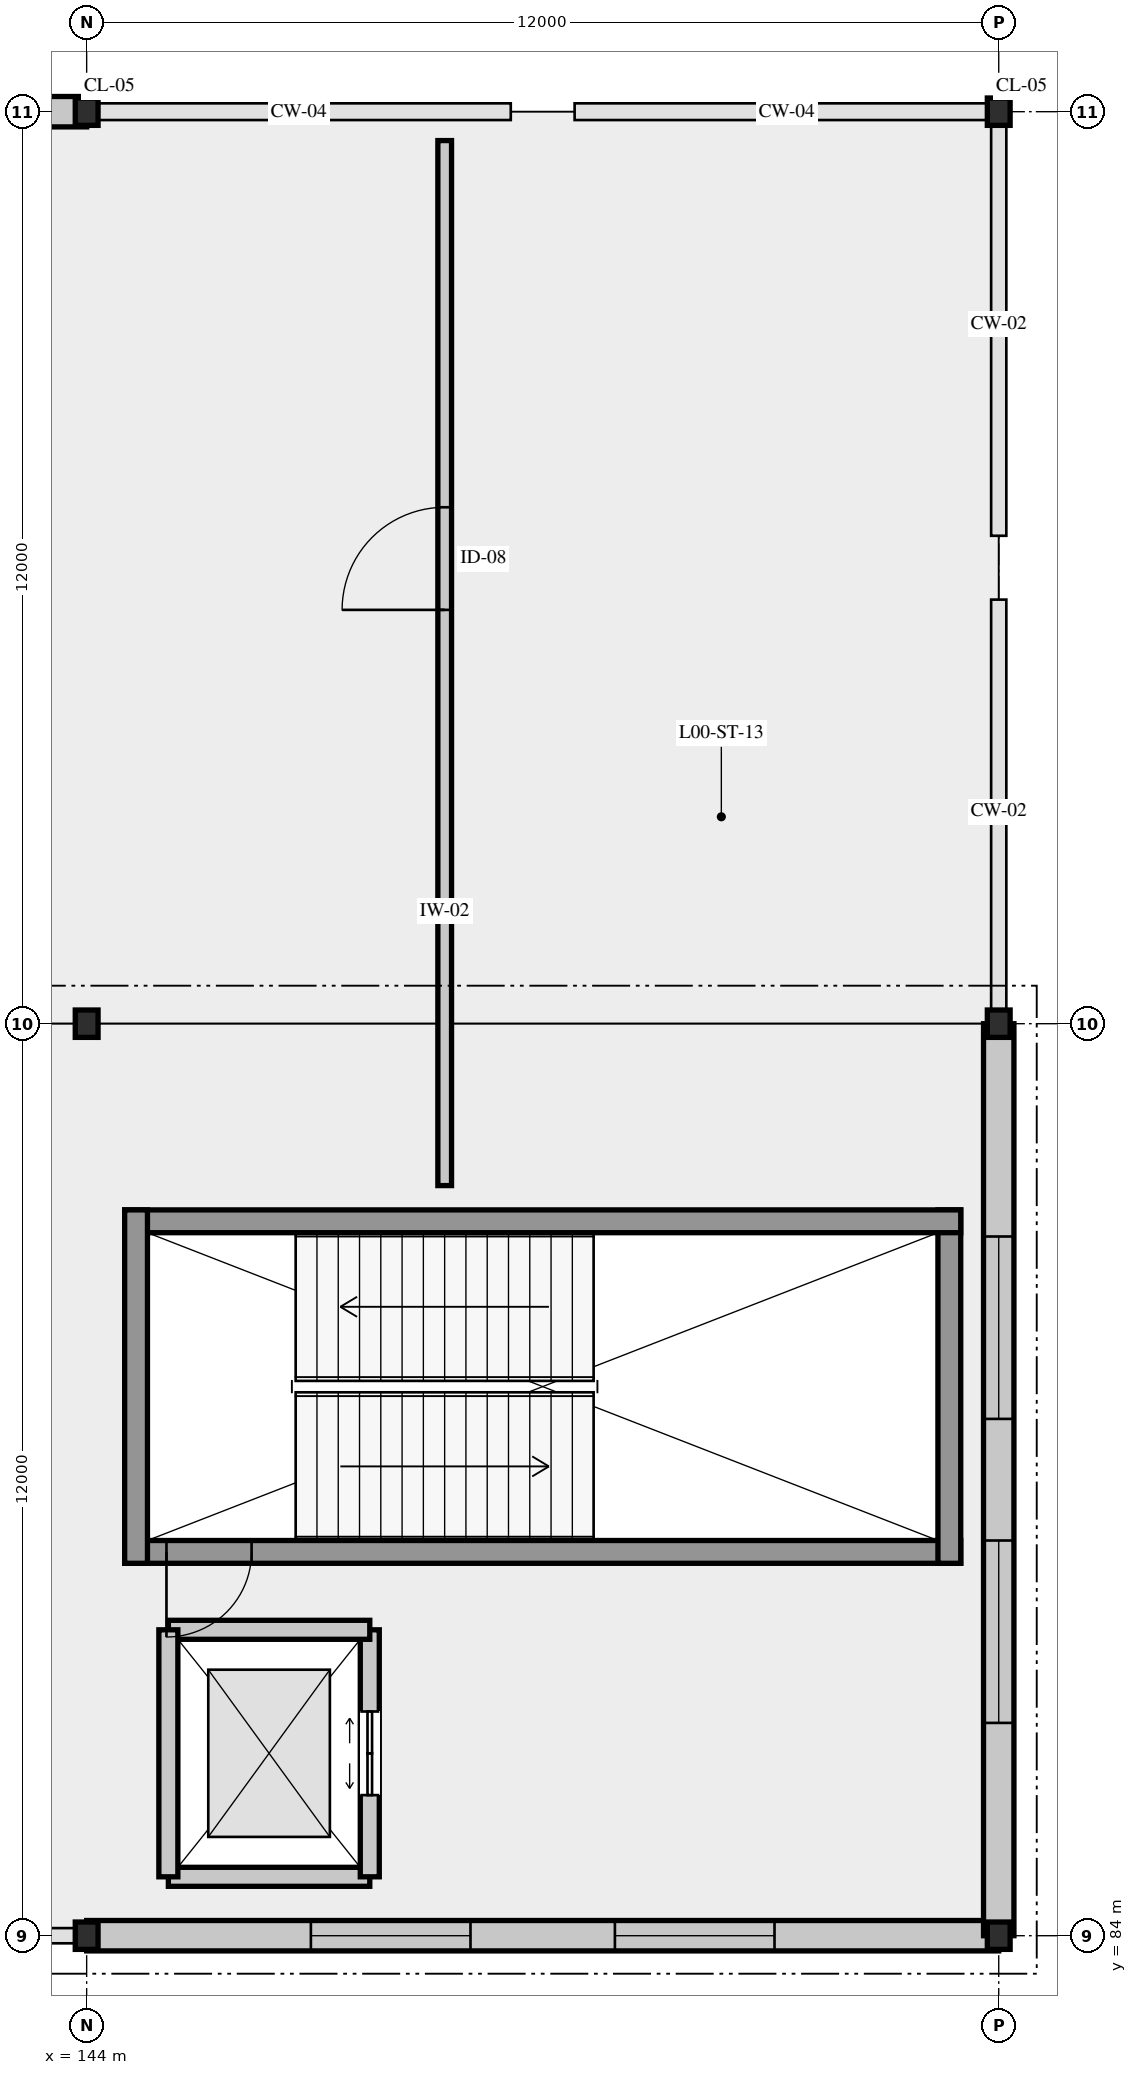
"""IFC4 building model, lengths in metres.
Left out: names, types, materials, properties, quantities, classifications, styles, units other than length and angle.
Written with IfcOpenShell. Run it as: python <this file> out.ifc"""

import sys

from ifc_helpers import new_model, si_unit, direction, frame, frame_2d, origin, origin_2d, place, context, subcontext, project, spatial, rectangle, i_section, extrude, element, fill, save


model = new_model("IFC4")
c1 = context("Model", 3, precision=1e-05, world=origin(), true_north=direction((0.0, 1.0)))
c2 = subcontext(c1, "Body", "Model", "MODEL_VIEW")
j1 = project(units=[si_unit("LENGTHUNIT", "METRE"), si_unit("PLANEANGLEUNIT", "RADIAN")], contexts=[c1])
p1 = place(None, origin())
s1 = spatial("IfcSite", under=j1, at=p1, CompositionType="ELEMENT")
p2 = place(p1, origin())
s2 = spatial("IfcBuilding", under=s1, at=p2, CompositionType="ELEMENT")
p3 = place(p2, origin())
s3 = spatial("IfcBuildingStorey", under=s2, at=p3, CompositionType="ELEMENT", Elevation=0.0)
for number, where, z_axis, x_axis in (
    (1, (144.0, 84.0, 0.0), (0.0, 0.0, 1.0), (1.0, 0.0, 0.0)),
    (2, (144.0, 96.0, 0.0), (0.0, 0.0, 1.0), (1.0, 0.0, 0.0)),
    (3, (144.0, 108.0, 0.0), (0.0, 0.0, 1.0), (1.0, 0.0, 0.0)),
    (4, (156.0, 84.0, 0.0), (0.0, 0.0, 1.0), (1.0, 0.0, 0.0)),
    (5, (156.0, 96.0, 0.0), (0.0, 0.0, 1.0), (1.0, 0.0, 0.0)),
    (6, (156.0, 108.0, 0.0), (0.0, 0.0, 1.0), (1.0, 0.0, 0.0)),
):
    element("IfcColumn", number, at=place(p3, frame(where, z_axis=z_axis, x_axis=x_axis)), inside=s3, PredefinedType="COLUMN", context=c2, shape_type="SweptSolid", body=[
        extrude(i_section(OverallWidth=0.3, OverallDepth=0.36, WebThickness=0.012, FlangeThickness=0.022, FilletRadius=0.027, at=origin_2d()), origin(), (0.0, 0.0, 1.0), 5.4),
    ])
p4 = place(p3, frame((144.0, 108.0, 0.0), z_axis=(0.0, 0.0, 1.0), x_axis=(-1.0, 0.0, 0.0)))
e7 = element("IfcWall", 7, at=p4, inside=s3, PredefinedType="SOLIDWALL", context=c2, shape_type="SweptSolid", body=[
    extrude(rectangle(XDim=12.0, YDim=0.4, at=frame_2d((6.0, 0.0))), origin(), (0.0, 0.0, 1.0), 4.52),
])
p5 = place(p4, frame((3.25, 0.0, 0.95)))
e8 = element("IfcOpeningElement", 8, at=p5, cuts=e7, PredefinedType="OPENING", context=c2, shape_type="SweptSolid", body=[
    extrude(rectangle(XDim=1.5, YDim=1.8, at=frame_2d((0.75, 0.9))), frame((0.0, 0.21, 0.0), z_axis=(0.0, -1.0, 0.0), x_axis=(1.0, 0.0, 0.0)), (0.0, 0.0, 1.0), 0.42),
])
p6 = place(p4, frame((7.25, 0.0, 0.95)))
e9 = element("IfcOpeningElement", 9, at=p6, cuts=e7, PredefinedType="OPENING", context=c2, shape_type="SweptSolid", body=[
    extrude(rectangle(XDim=1.5, YDim=1.8, at=frame_2d((0.75, 0.9))), frame((0.0, 0.21, 0.0), z_axis=(0.0, -1.0, 0.0), x_axis=(1.0, 0.0, 0.0)), (0.0, 0.0, 1.0), 0.42),
])
p7 = place(p3, frame((144.0, 84.0, 0.0), z_axis=(0.0, 0.0, 1.0), x_axis=(1.0, 0.0, 0.0)))
e10 = element("IfcWall", 10, at=p7, inside=s3, PredefinedType="SOLIDWALL", context=c2, shape_type="SweptSolid", body=[
    extrude(rectangle(XDim=12.0, YDim=0.4, at=frame_2d((6.0, 0.0))), origin(), (0.0, 0.0, 1.0), 4.52),
])
p8 = place(p7, frame((2.95, 0.0, 0.95)))
e11 = element("IfcOpeningElement", 11, at=p8, cuts=e10, PredefinedType="OPENING", context=c2, shape_type="SweptSolid", body=[
    extrude(rectangle(XDim=2.1, YDim=1.8, at=frame_2d((1.05, 0.9))), frame((0.0, 0.21, 0.0), z_axis=(0.0, -1.0, 0.0), x_axis=(1.0, 0.0, 0.0)), (0.0, 0.0, 1.0), 0.42),
])
p9 = place(p7, frame((6.95, 0.0, 0.95)))
e12 = element("IfcOpeningElement", 12, at=p9, cuts=e10, PredefinedType="OPENING", context=c2, shape_type="SweptSolid", body=[
    extrude(rectangle(XDim=2.1, YDim=1.8, at=frame_2d((1.05, 0.9))), frame((0.0, 0.21, 0.0), z_axis=(0.0, -1.0, 0.0), x_axis=(1.0, 0.0, 0.0)), (0.0, 0.0, 1.0), 0.42),
])
p10 = place(p3, frame((156.0, 84.0, 0.0), z_axis=(0.0, 0.0, 1.0), x_axis=(0.0, 1.0, 0.0)))
e13 = element("IfcWall", 13, at=p10, inside=s3, PredefinedType="SOLIDWALL", context=c2, shape_type="SweptSolid", body=[
    extrude(rectangle(XDim=12.0, YDim=0.4, at=frame_2d((6.0, 0.0))), origin(), (0.0, 0.0, 1.0), 4.52),
])
p11 = place(p10, frame((2.8, 0.0, 0.95)))
e14 = element("IfcOpeningElement", 14, at=p11, cuts=e13, PredefinedType="OPENING", context=c2, shape_type="SweptSolid", body=[
    extrude(rectangle(XDim=2.4, YDim=1.8, at=frame_2d((1.2, 0.9))), frame((0.0, 0.21, 0.0), z_axis=(0.0, -1.0, 0.0), x_axis=(1.0, 0.0, 0.0)), (0.0, 0.0, 1.0), 0.42),
])
p12 = place(p10, frame((6.8, 0.0, 0.95)))
e15 = element("IfcOpeningElement", 15, at=p12, cuts=e13, PredefinedType="OPENING", context=c2, shape_type="SweptSolid", body=[
    extrude(rectangle(XDim=2.4, YDim=1.8, at=frame_2d((1.2, 0.9))), frame((0.0, 0.21, 0.0), z_axis=(0.0, -1.0, 0.0), x_axis=(1.0, 0.0, 0.0)), (0.0, 0.0, 1.0), 0.42),
])
p13 = place(p3, frame((144.5, 89.05, 0.0), z_axis=(0.0, 0.0, 1.0), x_axis=(1.0, 0.0, 0.0)))
e16 = element("IfcWall", 16, at=p13, inside=s3, PredefinedType="SHEAR", context=c2, shape_type="SweptSolid", body=[
    extrude(rectangle(XDim=11.0, YDim=0.3, at=frame_2d((5.5, 0.0))), origin(), (0.0, 0.0, 1.0), 5.14),
])
p14 = place(p13, frame((0.55, 0.0, 0.0)))
e17 = element("IfcOpeningElement", 17, at=p14, cuts=e16, PredefinedType="OPENING", context=c2, shape_type="SweptSolid", body=[
    extrude(rectangle(XDim=1.12, YDim=2.2, at=frame_2d((0.56, 1.1))), frame((0.0, 0.16, 0.0), z_axis=(0.0, -1.0, 0.0), x_axis=(1.0, 0.0, 0.0)), (0.0, 0.0, 1.0), 0.32),
])
p15 = place(p3, frame((155.35, 88.9, 0.0), z_axis=(0.0, 0.0, 1.0), x_axis=(0.0, 1.0, 0.0)))
e18 = element("IfcWall", 18, at=p15, inside=s3, PredefinedType="SHEAR", context=c2, shape_type="SweptSolid", body=[
    extrude(rectangle(XDim=4.65, YDim=0.3, at=frame_2d((2.325, 0.0))), origin(), (0.0, 0.0, 1.0), 5.14),
])
p16 = place(p3, frame((155.5, 93.4, 0.0), z_axis=(0.0, 0.0, 1.0), x_axis=(-1.0, 0.0, 0.0)))
e19 = element("IfcWall", 19, at=p16, inside=s3, PredefinedType="SHEAR", context=c2, shape_type="SweptSolid", body=[
    extrude(rectangle(XDim=11.0, YDim=0.3, at=frame_2d((5.5, 0.0))), origin(), (0.0, 0.0, 1.0), 5.14),
])
p17 = place(p3, frame((144.65, 93.55, 0.0), z_axis=(0.0, 0.0, 1.0), x_axis=(0.0, -1.0, 0.0)))
e20 = element("IfcWall", 20, at=p17, inside=s3, PredefinedType="SHEAR", context=c2, shape_type="SweptSolid", body=[
    extrude(rectangle(XDim=4.65, YDim=0.3, at=frame_2d((2.325, 0.0))), origin(), (0.0, 0.0, 1.0), 5.14),
])
p18 = place(p3, frame((145.075, 84.775, 0.0), z_axis=(0.0, 0.0, 1.0), x_axis=(1.0, 0.0, 0.0)))
e21 = element("IfcWall", 21, at=p18, inside=s3, PredefinedType="SOLIDWALL", context=c2, shape_type="SweptSolid", body=[
    extrude(rectangle(XDim=2.65, YDim=0.25, at=frame_2d((1.325, 0.0))), origin(), (0.0, 0.0, 1.0), 5.14),
])
p19 = place(p3, frame((147.725, 84.775, 0.0), z_axis=(0.0, 0.0, 1.0), x_axis=(0.0, 1.0, 0.0)))
e22 = element("IfcWall", 22, at=p19, inside=s3, PredefinedType="SOLIDWALL", context=c2, shape_type="SweptSolid", body=[
    extrude(rectangle(XDim=3.25, YDim=0.25, at=frame_2d((1.625, 0.0))), origin(), (0.0, 0.0, 1.0), 5.14),
])
p20 = place(p19, frame((1.075, 0.0, 0.0)))
e23 = element("IfcOpeningElement", 23, at=p20, cuts=e22, PredefinedType="OPENING", context=c2, shape_type="SweptSolid", body=[
    extrude(rectangle(XDim=1.1, YDim=2.2, at=frame_2d((0.55, 1.1))), frame((0.0, 0.135, 0.0), z_axis=(0.0, -1.0, 0.0), x_axis=(1.0, 0.0, 0.0)), (0.0, 0.0, 1.0), 0.27),
])
p21 = place(p3, frame((147.725, 88.025, 0.0), z_axis=(0.0, 0.0, 1.0), x_axis=(-1.0, 0.0, 0.0)))
e24 = element("IfcWall", 24, at=p21, inside=s3, PredefinedType="SOLIDWALL", context=c2, shape_type="SweptSolid", body=[
    extrude(rectangle(XDim=2.65, YDim=0.25, at=frame_2d((1.325, 0.0))), origin(), (0.0, 0.0, 1.0), 5.14),
])
p22 = place(p3, frame((145.075, 88.025, 0.0), z_axis=(0.0, 0.0, 1.0), x_axis=(0.0, -1.0, 0.0)))
e25 = element("IfcWall", 25, at=p22, inside=s3, PredefinedType="SOLIDWALL", context=c2, shape_type="SweptSolid", body=[
    extrude(rectangle(XDim=3.25, YDim=0.25, at=frame_2d((1.625, 0.0))), origin(), (0.0, 0.0, 1.0), 5.14),
])
p23 = place(p3, frame((148.711, 93.87, 0.0), z_axis=(0.0, 0.0, 1.0), x_axis=(0.0, 1.0, 0.0)))
e26 = element("IfcWall", 26, at=p23, inside=s3, PredefinedType="PARTITIONING", context=c2, shape_type="SweptSolid", body=[
    extrude(rectangle(XDim=13.75, YDim=0.18, at=frame_2d((6.875, 0.0))), origin(), (0.0, 0.0, 1.0), 4.53),
])
p24 = place(p23, frame((7.575, 0.0, 0.0)))
e27 = element("IfcOpeningElement", 27, at=p24, cuts=e26, PredefinedType="OPENING", context=c2, shape_type="SweptSolid", body=[
    extrude(rectangle(XDim=1.35, YDim=2.3, at=frame_2d((0.675, 1.15))), frame((0.0, 0.1, 0.0), z_axis=(0.0, -1.0, 0.0), x_axis=(1.0, 0.0, 0.0)), (0.0, 0.0, 1.0), 0.2),
])
p25 = place(p8, origin())
e28 = element("IfcWindow", 28, at=p25, inside=s3, PartitioningType="SINGLE_PANEL", PredefinedType="WINDOW", context=c2, shape_type="SweptSolid", body=[
    extrude(rectangle(XDim=2.1, YDim=1.8, at=frame_2d((1.05, 0.9))), frame((0.0, 0.03, 0.0), z_axis=(0.0, -1.0, 0.0), x_axis=(1.0, 0.0, 0.0)), (0.0, 0.0, 1.0), 0.06),
])
fill(e11, e28)
p26 = place(p9, origin())
e29 = element("IfcWindow", 29, at=p26, inside=s3, PartitioningType="SINGLE_PANEL", PredefinedType="WINDOW", context=c2, shape_type="SweptSolid", body=[
    extrude(rectangle(XDim=2.1, YDim=1.8, at=frame_2d((1.05, 0.9))), frame((0.0, 0.03, 0.0), z_axis=(0.0, -1.0, 0.0), x_axis=(1.0, 0.0, 0.0)), (0.0, 0.0, 1.0), 0.06),
])
fill(e12, e29)
p27 = place(p11, origin())
e30 = element("IfcWindow", 30, at=p27, inside=s3, PartitioningType="SINGLE_PANEL", PredefinedType="WINDOW", context=c2, shape_type="SweptSolid", body=[
    extrude(rectangle(XDim=2.4, YDim=1.8, at=frame_2d((1.2, 0.9))), frame((0.0, 0.03, 0.0), z_axis=(0.0, -1.0, 0.0), x_axis=(1.0, 0.0, 0.0)), (0.0, 0.0, 1.0), 0.06),
])
fill(e14, e30)
p28 = place(p12, origin())
e31 = element("IfcWindow", 31, at=p28, inside=s3, PartitioningType="SINGLE_PANEL", PredefinedType="WINDOW", context=c2, shape_type="SweptSolid", body=[
    extrude(rectangle(XDim=2.4, YDim=1.8, at=frame_2d((1.2, 0.9))), frame((0.0, 0.03, 0.0), z_axis=(0.0, -1.0, 0.0), x_axis=(1.0, 0.0, 0.0)), (0.0, 0.0, 1.0), 0.06),
])
fill(e15, e31)
p29 = place(p14, frame((1.12, 0.0, 0.0), z_axis=(0.0, 0.0, 1.0), x_axis=(-1.0, 0.0, 0.0)))
e32 = element("IfcDoor", 32, at=p29, inside=s3, OperationType="SINGLE_SWING_LEFT", PredefinedType="DOOR", context=c2, shape_type="SweptSolid", body=[
    extrude(rectangle(XDim=1.12, YDim=2.2, at=frame_2d((0.56, 1.1))), frame((0.0, 0.025, 0.0), z_axis=(0.0, -1.0, 0.0), x_axis=(1.0, 0.0, 0.0)), (0.0, 0.0, 1.0), 0.05),
])
fill(e17, e32)
p30 = place(p20, origin())
e33 = element("IfcDoor", 33, at=p30, inside=s3, OperationType="SLIDING_TO_LEFT", PredefinedType="DOOR", context=c2, shape_type="SweptSolid", body=[
    extrude(rectangle(XDim=1.1, YDim=2.2, at=frame_2d((0.55, 1.1))), frame((0.0, 0.025, 0.0), z_axis=(0.0, -1.0, 0.0), x_axis=(1.0, 0.0, 0.0)), (0.0, 0.0, 1.0), 0.05),
])
fill(e23, e33)
p31 = place(p24, origin())
e34 = element("IfcDoor", 34, at=p31, inside=s3, OperationType="DOUBLE_SWING_LEFT", PredefinedType="DOOR", context=c2, shape_type="SweptSolid", body=[
    extrude(rectangle(XDim=1.35, YDim=2.3, at=frame_2d((0.675, 1.15))), frame((0.0, 0.025, 0.0), z_axis=(0.0, -1.0, 0.0), x_axis=(1.0, 0.0, 0.0)), (0.0, 0.0, 1.0), 0.05),
])
fill(e27, e34)
save(model, sys.argv[1])
